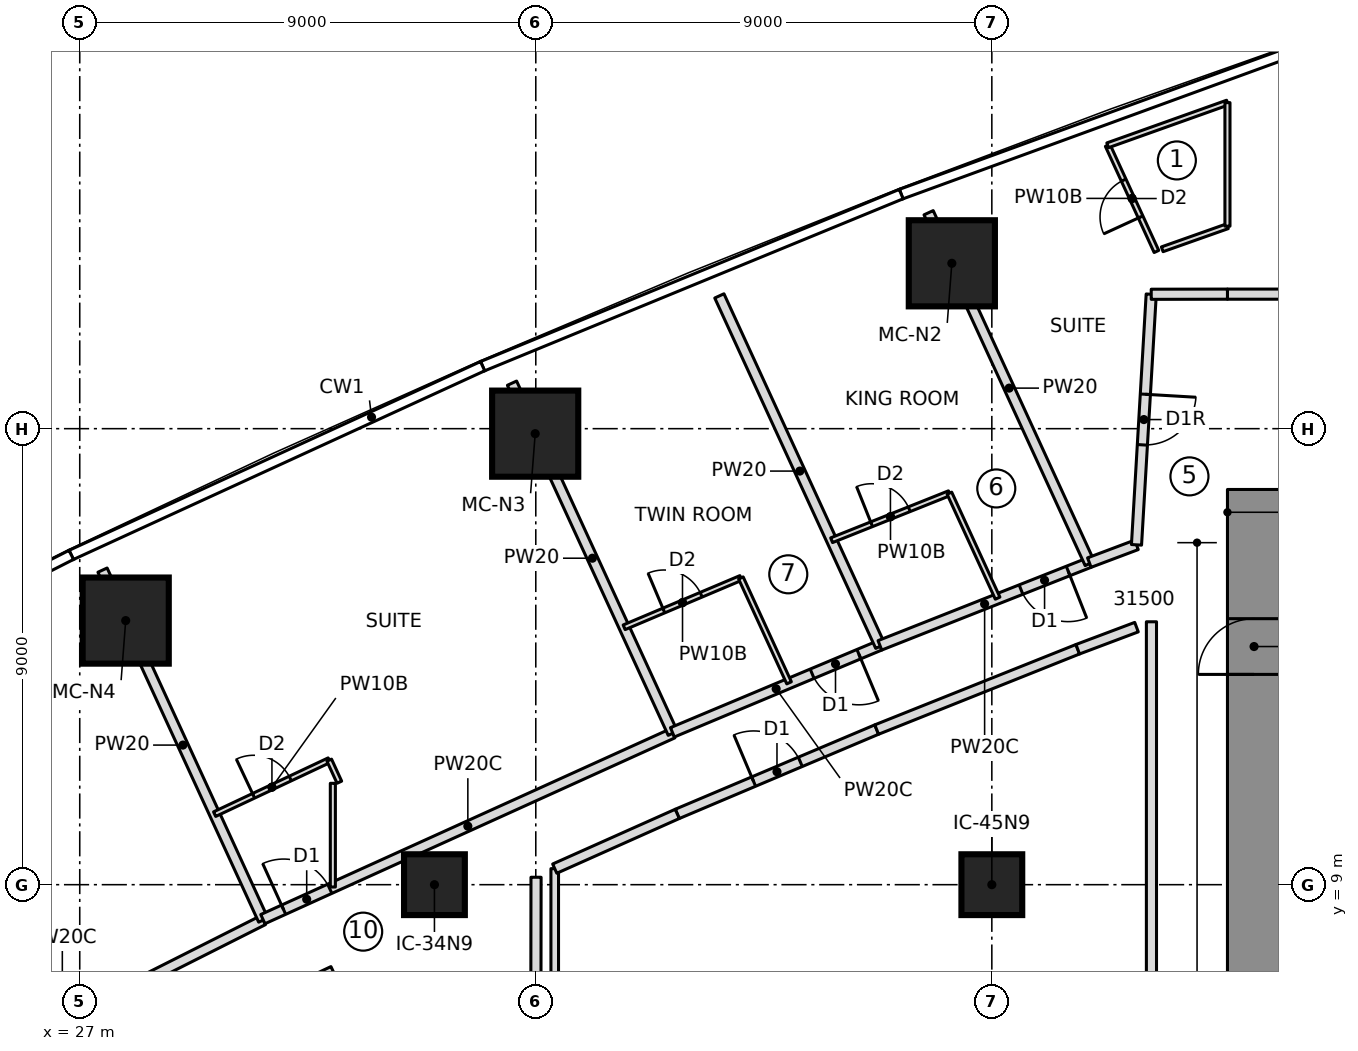
"""IFC4 building model, lengths in metres.
Left out: names, types, materials, properties, quantities, classifications, styles, units other than length and angle.
Written with IfcOpenShell. Run it as: python <this file> out.ifc"""

import sys

from ifc_helpers import new_model, si_unit, direction, frame, frame_2d, origin, origin_2d, place, context, subcontext, project, spatial, rectangle, extrude, element, fill, save


model = new_model("IFC4")
c1 = context("Model", 3, precision=1e-05, world=origin(), true_north=direction((0.0, 1.0)))
c2 = subcontext(c1, "Body", "Model", "MODEL_VIEW")
j1 = project(units=[si_unit("LENGTHUNIT", "METRE"), si_unit("PLANEANGLEUNIT", "RADIAN")], contexts=[c1])
p1 = place(None, origin())
s1 = spatial("IfcSite", under=j1, at=p1, CompositionType="ELEMENT")
p2 = place(p1, origin())
s2 = spatial("IfcBuilding", under=s1, at=p2, CompositionType="ELEMENT")
p3 = place(p2, frame((0.0, 0.0, 95.55)))
s3 = spatial("IfcBuildingStorey", under=s2, at=p3, CompositionType="ELEMENT", Elevation=95.55)
p4 = place(p3, frame((50.175, 6.65, 0.0), z_axis=(0.0, 0.0, 1.0), x_axis=(0.0, 1.0, 0.0)))
e1 = element("IfcWall", 1, at=p4, inside=s3, PredefinedType="SHEAR", context=c2, shape_type="SweptSolid", body=[
    extrude(rectangle(XDim=10.15, YDim=1.05, at=frame_2d((5.075, 0.0))), origin(), (0.0, 0.0, 1.0), 3.55),
])
p5 = place(p4, frame((6.5, 0.0, 0.0)))
e2 = element("IfcOpeningElement", 2, at=p5, cuts=e1, PredefinedType="OPENING", context=c2, shape_type="SweptSolid", body=[
    extrude(rectangle(XDim=1.1, YDim=2.1, at=frame_2d((0.55, 1.05))), frame((0.0, 0.535, 0.0), z_axis=(0.0, -1.0, 0.0), x_axis=(1.0, 0.0, 0.0)), (0.0, 0.0, 1.0), 1.07),
])
for number, where, z_axis, x_axis in (
    (3, (44.211, 21.264, 0.0), (0.0, 0.0, 1.0), (1.0, 0.0, 0.0)),
    (4, (35.988, 17.902, 0.0), (0.0, 0.0, 1.0), (1.0, 0.0, 0.0)),
    (5, (27.907, 14.212, 0.0), (0.0, 0.0, 1.0), (1.0, 0.0, 0.0)),
):
    element("IfcColumn", number, at=place(p3, frame(where, z_axis=z_axis, x_axis=x_axis)), inside=s3, PredefinedType="COLUMN", context=c2, shape_type="SweptSolid", body=[
        extrude(rectangle(XDim=1.7, YDim=1.7, at=origin_2d()), origin(), (0.0, 0.0, 1.0), 3.55),
    ])
for number, where, z_axis, x_axis in (
    (6, (34.0, 9.0, 0.0), (0.0, 0.0, 1.0), (1.0, 0.0, 0.0)),
    (7, (45.0, 9.0, 0.0), (0.0, 0.0, 1.0), (1.0, 0.0, 0.0)),
):
    element("IfcColumn", number, at=place(p3, frame(where, z_axis=z_axis, x_axis=x_axis)), inside=s3, PredefinedType="COLUMN", context=c2, shape_type="SweptSolid", body=[
        extrude(rectangle(XDim=1.2, YDim=1.2, at=origin_2d()), origin(), (0.0, 0.0, 1.0), 3.55),
    ])
p6 = place(p3, frame((22.69, 4.302, 0.0), z_axis=(0.0, 0.0, 1.0), x_axis=(0.892904919467, 0.450245271815, 0.0)))
e8 = element("IfcWall", 8, at=p6, inside=s3, PredefinedType="PARTITIONING", context=c2, shape_type="SweptSolid", body=[
    extrude(rectangle(XDim=8.883, YDim=0.2, at=frame_2d((4.441, 0.0))), origin(), (0.0, 0.0, 1.0), 3.25),
])
p7 = place(p6, frame((3.05, 0.0, 0.0)))
e9 = element("IfcOpeningElement", 9, at=p7, cuts=e8, PredefinedType="OPENING", context=c2, shape_type="SweptSolid", body=[
    extrude(rectangle(XDim=1.0, YDim=2.1, at=frame_2d((0.5, 1.05))), frame((0.0, 0.11, 0.0), z_axis=(0.0, -1.0, 0.0), x_axis=(1.0, 0.0, 0.0)), (0.0, 0.0, 1.0), 0.22),
])
p8 = place(p3, frame((30.622, 8.302, 0.0), z_axis=(0.0, 0.0, 1.0), x_axis=(-0.417429919618, 0.90870911859, 0.0)))
e10 = element("IfcWall", 10, at=p8, inside=s3, PredefinedType="PARTITIONING", context=c2, shape_type="SweptSolid", body=[
    extrude(rectangle(XDim=7.6, YDim=0.2, at=frame_2d((3.8, 0.0))), origin(), (0.0, 0.0, 1.0), 3.25),
])
p9 = place(p3, frame((30.614, 8.32, 0.0), z_axis=(0.0, 0.0, 1.0), x_axis=(0.910751030363, 0.41295588226, 0.0)))
e11 = element("IfcWall", 11, at=p9, inside=s3, PredefinedType="PARTITIONING", context=c2, shape_type="SweptSolid", body=[
    extrude(rectangle(XDim=8.883, YDim=0.2, at=frame_2d((4.442, 0.0))), origin(), (0.0, 0.0, 1.0), 3.25),
])
p10 = place(p9, frame((0.45, 0.0, 0.0)))
e12 = element("IfcOpeningElement", 12, at=p10, cuts=e11, PredefinedType="OPENING", context=c2, shape_type="SweptSolid", body=[
    extrude(rectangle(XDim=1.0, YDim=2.1, at=frame_2d((0.5, 1.05))), frame((0.0, 0.11, 0.0), z_axis=(0.0, -1.0, 0.0), x_axis=(1.0, 0.0, 0.0)), (0.0, 0.0, 1.0), 0.22),
])
p11 = place(p3, frame((29.662, 10.392, 0.0), z_axis=(0.0, 0.0, 1.0), x_axis=(0.904688082375, 0.426074493027, 0.0)))
e13 = element("IfcWall", 13, at=p11, inside=s3, PredefinedType="PARTITIONING", context=c2, shape_type="SweptSolid", body=[
    extrude(rectangle(XDim=2.5, YDim=0.1, at=frame_2d((1.25, 0.0))), origin(), (0.0, 0.0, 1.0), 3.25),
])
p12 = place(p11, frame((0.85, 0.0, 0.0)))
e14 = element("IfcOpeningElement", 14, at=p12, cuts=e13, PredefinedType="OPENING", context=c2, shape_type="SweptSolid", body=[
    extrude(rectangle(XDim=0.8, YDim=2.1, at=frame_2d((0.4, 1.05))), frame((0.0, 0.06, 0.0), z_axis=(0.0, -1.0, 0.0), x_axis=(1.0, 0.0, 0.0)), (0.0, 0.0, 1.0), 0.12),
])
p13 = place(p3, frame((31.924, 11.457, 0.0), z_axis=(0.0, 0.0, 1.0), x_axis=(0.4176025781, -0.908629785316, 0.0)))
e15 = element("IfcWall", 15, at=p13, inside=s3, PredefinedType="PARTITIONING", context=c2, shape_type="SweptSolid", body=[
    extrude(rectangle(XDim=0.479, YDim=0.1, at=frame_2d((0.239, 0.0))), origin(), (0.0, 0.0, 1.0), 3.25),
])
p14 = place(p3, frame((38.704, 11.989, 0.0), z_axis=(0.0, 0.0, 1.0), x_axis=(-0.417416334044, 0.908715359215, 0.0)))
e16 = element("IfcWall", 16, at=p14, inside=s3, PredefinedType="PARTITIONING", context=c2, shape_type="SweptSolid", body=[
    extrude(rectangle(XDim=7.604, YDim=0.2, at=frame_2d((3.802, 0.0))), origin(), (0.0, 0.0, 1.0), 3.25),
])
p15 = place(p3, frame((42.791, 13.724, 0.0), z_axis=(0.0, 0.0, 1.0), x_axis=(-0.922230433067, -0.386640696675, 0.0)))
e17 = element("IfcWall", 17, at=p15, inside=s3, PredefinedType="PARTITIONING", context=c2, shape_type="SweptSolid", body=[
    extrude(rectangle(XDim=4.44, YDim=0.2, at=frame_2d((2.22, 0.0))), origin(), (0.0, 0.0, 1.0), 3.25),
])
p16 = place(p15, frame((0.45, 0.0, 0.0)))
e18 = element("IfcOpeningElement", 18, at=p16, cuts=e17, PredefinedType="OPENING", context=c2, shape_type="SweptSolid", body=[
    extrude(rectangle(XDim=1.0, YDim=2.1, at=frame_2d((0.5, 1.05))), frame((0.0, 0.11, 0.0), z_axis=(0.0, -1.0, 0.0), x_axis=(1.0, 0.0, 0.0)), (0.0, 0.0, 1.0), 0.22),
])
p17 = place(p3, frame((37.744, 14.08, 0.0), z_axis=(0.0, 0.0, 1.0), x_axis=(0.921042675983, 0.38946166566, 0.0)))
e19 = element("IfcWall", 19, at=p17, inside=s3, PredefinedType="PARTITIONING", context=c2, shape_type="SweptSolid", body=[
    extrude(rectangle(XDim=2.501, YDim=0.1, at=frame_2d((1.25, 0.0))), origin(), (0.0, 0.0, 1.0), 3.25),
])
p18 = place(p17, frame((0.85, 0.0, 0.0)))
e20 = element("IfcOpeningElement", 20, at=p18, cuts=e19, PredefinedType="OPENING", context=c2, shape_type="SweptSolid", body=[
    extrude(rectangle(XDim=0.8, YDim=2.1, at=frame_2d((0.4, 1.05))), frame((0.0, 0.06, 0.0), z_axis=(0.0, -1.0, 0.0), x_axis=(1.0, 0.0, 0.0)), (0.0, 0.0, 1.0), 0.12),
])
p19 = place(p3, frame((40.048, 15.054, 0.0), z_axis=(0.0, 0.0, 1.0), x_axis=(0.417433204355, -0.908707609686, 0.0)))
e21 = element("IfcWall", 21, at=p19, inside=s3, PredefinedType="PARTITIONING", context=c2, shape_type="SweptSolid", body=[
    extrude(rectangle(XDim=2.278, YDim=0.1, at=frame_2d((1.139, 0.0))), origin(), (0.0, 0.0, 1.0), 3.25),
])
p20 = place(p3, frame((42.799, 13.705, 0.0), z_axis=(0.0, 0.0, 1.0), x_axis=(-0.417427858403, 0.908710065438, 0.0)))
e22 = element("IfcWall", 22, at=p20, inside=s3, PredefinedType="PARTITIONING", context=c2, shape_type="SweptSolid", body=[
    extrude(rectangle(XDim=7.61, YDim=0.2, at=frame_2d((3.805, 0.0))), origin(), (0.0, 0.0, 1.0), 3.25),
])
p21 = place(p3, frame((46.924, 15.357, 0.0), z_axis=(0.0, 0.0, 1.0), x_axis=(-0.930040633249, -0.367456692014, 0.0)))
e23 = element("IfcWall", 23, at=p21, inside=s3, PredefinedType="PARTITIONING", context=c2, shape_type="SweptSolid", body=[
    extrude(rectangle(XDim=4.444, YDim=0.2, at=frame_2d((2.222, 0.0))), origin(), (0.0, 0.0, 1.0), 3.25),
])
p22 = place(p21, frame((0.45, 0.0, 0.0)))
e24 = element("IfcOpeningElement", 24, at=p22, cuts=e23, PredefinedType="OPENING", context=c2, shape_type="SweptSolid", body=[
    extrude(rectangle(XDim=1.0, YDim=2.1, at=frame_2d((0.5, 1.05))), frame((0.0, 0.11, 0.0), z_axis=(0.0, -1.0, 0.0), x_axis=(1.0, 0.0, 0.0)), (0.0, 0.0, 1.0), 0.22),
])
p23 = place(p3, frame((41.838, 15.798, 0.0), z_axis=(0.0, 0.0, 1.0), x_axis=(0.928638024739, 0.370987087388, 0.0)))
e25 = element("IfcWall", 25, at=p23, inside=s3, PredefinedType="PARTITIONING", context=c2, shape_type="SweptSolid", body=[
    extrude(rectangle(XDim=2.503, YDim=0.1, at=frame_2d((1.252, 0.0))), origin(), (0.0, 0.0, 1.0), 3.25),
])
p24 = place(p23, frame((0.85, 0.0, 0.0)))
e26 = element("IfcOpeningElement", 26, at=p24, cuts=e25, PredefinedType="OPENING", context=c2, shape_type="SweptSolid", body=[
    extrude(rectangle(XDim=0.8, YDim=2.1, at=frame_2d((0.4, 1.05))), frame((0.0, 0.06, 0.0), z_axis=(0.0, -1.0, 0.0), x_axis=(1.0, 0.0, 0.0)), (0.0, 0.0, 1.0), 0.12),
])
p25 = place(p3, frame((44.163, 16.727, 0.0), z_axis=(0.0, 0.0, 1.0), x_axis=(0.417373525971, -0.908735021785, 0.0)))
e27 = element("IfcWall", 27, at=p25, inside=s3, PredefinedType="PARTITIONING", context=c2, shape_type="SweptSolid", body=[
    extrude(rectangle(XDim=2.28, YDim=0.1, at=frame_2d((1.14, 0.0))), origin(), (0.0, 0.0, 1.0), 3.25),
])
p26 = place(p3, frame((46.933, 15.339, 0.0), z_axis=(0.0, 0.0, 1.0), x_axis=(-0.417437957167, 0.908705426371, 0.0)))
e28 = element("IfcWall", 28, at=p26, inside=s3, PredefinedType="PARTITIONING", context=c2, shape_type="SweptSolid", body=[
    extrude(rectangle(XDim=7.619, YDim=0.2, at=frame_2d((3.81, 0.0))), origin(), (0.0, 0.0, 1.0), 3.25),
])
p27 = place(p3, frame((49.65, 21.996, 0.0), z_axis=(0.0, 0.0, 1.0), x_axis=(-0.942692856107, -0.333661773425, 0.0)))
e29 = element("IfcWall", 29, at=p27, inside=s3, PredefinedType="PARTITIONING", context=c2, shape_type="SweptSolid", body=[
    extrude(rectangle(XDim=1.365, YDim=0.1, at=frame_2d((0.683, 0.0))), origin(), (0.0, 0.0, 1.0), 3.25),
])
p28 = place(p3, frame((48.249, 21.497, 0.0), z_axis=(0.0, 0.0, 1.0), x_axis=(-0.41749308293, 0.908680100864, 0.0)))
e30 = element("IfcWall", 30, at=p28, inside=s3, PredefinedType="PARTITIONING", context=c2, shape_type="SweptSolid", body=[
    extrude(rectangle(XDim=2.306, YDim=0.1, at=frame_2d((1.153, 0.0))), origin(), (0.0, 0.0, 1.0), 3.25),
])
p29 = place(p28, frame((0.75, 0.0, 0.0)))
e31 = element("IfcOpeningElement", 31, at=p29, cuts=e30, PredefinedType="OPENING", context=c2, shape_type="SweptSolid", body=[
    extrude(rectangle(XDim=0.8, YDim=2.1, at=frame_2d((0.4, 1.05))), frame((0.0, 0.06, 0.0), z_axis=(0.0, -1.0, 0.0), x_axis=(1.0, 0.0, 0.0)), (0.0, 0.0, 1.0), 0.12),
])
p30 = place(p3, frame((31.025, 6.833, 0.0), z_axis=(0.0, 0.0, 1.0), x_axis=(0.904690325494, 0.426069730159, 0.0)))
e32 = element("IfcWall", 32, at=p30, inside=s3, PredefinedType="PARTITIONING", context=c2, shape_type="SweptSolid", body=[
    extrude(rectangle(XDim=1.078, YDim=0.2, at=frame_2d((0.539, 0.0))), origin(), (0.0, 0.0, 1.0), 3.25),
])
p31 = place(p3, frame((36.374, -9.317, 0.0), z_axis=(0.0, 0.0, 1.0), x_axis=(0.0, 1.0, 0.0)))
e33 = element("IfcWall", 33, at=p31, inside=s3, PredefinedType="PARTITIONING", context=c2, shape_type="SweptSolid", body=[
    extrude(rectangle(XDim=18.634, YDim=0.15, at=frame_2d((9.317, 0.0))), origin(), (0.0, 0.0, 1.0), 3.25),
])
p32 = place(p3, frame((38.792, 10.397, 0.0), z_axis=(0.0, 0.0, 1.0), x_axis=(0.921037415532, 0.389474105929, 0.0)))
e34 = element("IfcWall", 34, at=p32, inside=s3, PredefinedType="PARTITIONING", context=c2, shape_type="SweptSolid", body=[
    extrude(rectangle(XDim=4.273, YDim=0.2, at=frame_2d((2.137, 0.0))), origin(), (0.0, 0.0, 1.0), 3.25),
])
p33 = place(p32, frame((1.636, 0.0, 0.0)))
e35 = element("IfcOpeningElement", 35, at=p33, cuts=e34, PredefinedType="OPENING", context=c2, shape_type="SweptSolid", body=[
    extrude(rectangle(XDim=1.0, YDim=2.1, at=frame_2d((0.5, 1.05))), frame((0.0, 0.11, 0.0), z_axis=(0.0, -1.0, 0.0), x_axis=(1.0, 0.0, 0.0)), (0.0, 0.0, 1.0), 0.22),
])
p34 = place(p3, frame((42.728, 12.062, 0.0), z_axis=(0.0, 0.0, 1.0), x_axis=(0.928638161177, 0.370986745864, 0.0)))
e36 = element("IfcWall", 36, at=p34, inside=s3, PredefinedType="PARTITIONING", context=c2, shape_type="SweptSolid", body=[
    extrude(rectangle(XDim=4.273, YDim=0.2, at=frame_2d((2.136, 0.0))), origin(), (0.0, 0.0, 1.0), 3.25),
])
p35 = place(p3, frame((36.374, 9.317, 0.0), z_axis=(0.0, 0.0, 1.0), x_axis=(0.913030623494, 0.407891015544, 0.0)))
e37 = element("IfcWall", 37, at=p35, inside=s3, PredefinedType="PARTITIONING", context=c2, shape_type="SweptSolid", body=[
    extrude(rectangle(XDim=2.648, YDim=0.2, at=frame_2d((1.324, 0.0))), origin(), (0.0, 0.0, 1.0), 3.25),
])
p36 = place(p3, frame((54.625, 20.655, 0.0), z_axis=(0.0, 0.0, 1.0), x_axis=(-1.0, 0.0, 0.0)))
e38 = element("IfcWall", 38, at=p36, inside=s3, PredefinedType="PARTITIONING", context=c2, shape_type="SweptSolid", body=[
    extrude(rectangle(XDim=4.976, YDim=0.2, at=frame_2d((2.488, 0.0))), origin(), (0.0, 0.0, 1.0), 3.25),
])
p37 = place(p36, frame((1.988, 0.0, 0.0)))
e39 = element("IfcOpeningElement", 39, at=p37, cuts=e38, PredefinedType="OPENING", context=c2, shape_type="SweptSolid", body=[
    extrude(rectangle(XDim=1.5, YDim=2.1, at=frame_2d((0.75, 1.05))), frame((0.0, 0.11, 0.0), z_axis=(0.0, -1.0, 0.0), x_axis=(1.0, 0.0, 0.0)), (0.0, 0.0, 1.0), 0.22),
])
p38 = place(p3, frame((31.995, 11.0, 0.0), z_axis=(0.0, 0.0, 1.0), x_axis=(0.0, -1.0, 0.0)))
e40 = element("IfcWall", 40, at=p38, inside=s3, PredefinedType="PARTITIONING", context=c2, shape_type="SweptSolid", body=[
    extrude(rectangle(XDim=2.046, YDim=0.1, at=frame_2d((1.023, 0.0))), origin(), (0.0, 0.0, 1.0), 3.25),
])
p39 = place(p3, frame((47.286, 23.592, 0.0), z_axis=(0.0, 0.0, 1.0), x_axis=(0.941933231826, 0.335800218555, 0.0)))
e41 = element("IfcWall", 41, at=p39, inside=s3, PredefinedType="PARTITIONING", context=c2, shape_type="SweptSolid", body=[
    extrude(rectangle(XDim=2.51, YDim=0.1, at=frame_2d((1.255, 0.0))), origin(), (0.0, 0.0, 1.0), 3.25),
])
p40 = place(p3, frame((49.65, 24.435, 0.0), z_axis=(0.0, 0.0, 1.0), x_axis=(0.0, -1.0, 0.0)))
e42 = element("IfcWall", 42, at=p40, inside=s3, PredefinedType="PARTITIONING", context=c2, shape_type="SweptSolid", body=[
    extrude(rectangle(XDim=2.439, YDim=0.1, at=frame_2d((1.22, 0.0))), origin(), (0.0, 0.0, 1.0), 3.25),
])
p41 = place(p3, frame((47.855, 15.707, 0.0), z_axis=(0.0, 0.0, 1.0), x_axis=(-0.935803526171, -0.35252199989, 0.0)))
e43 = element("IfcWall", 43, at=p41, inside=s3, PredefinedType="PARTITIONING", context=c2, shape_type="SweptSolid", body=[
    extrude(rectangle(XDim=0.995, YDim=0.2, at=frame_2d((0.497, 0.0))), origin(), (0.0, 0.0, 1.0), 3.25),
])
p42 = place(p3, frame((46.696, 13.647, 0.0), z_axis=(0.0, 0.0, 1.0), x_axis=(0.935907269358, 0.352246480696, 0.0)))
e44 = element("IfcWall", 44, at=p42, inside=s3, PredefinedType="PARTITIONING", context=c2, shape_type="SweptSolid", body=[
    extrude(rectangle(XDim=1.239, YDim=0.2, at=frame_2d((0.619, 0.0))), origin(), (0.0, 0.0, 1.0), 3.25),
])
p43 = place(p3, frame((48.146, 20.652, 0.0), z_axis=(0.0, 0.0, 1.0), x_axis=(-0.058649792989, -0.998278619315, 0.0)))
e45 = element("IfcWall", 45, at=p43, inside=s3, PredefinedType="PARTITIONING", context=c2, shape_type="SweptSolid", body=[
    extrude(rectangle(XDim=4.954, YDim=0.2, at=frame_2d((2.477, 0.0))), origin(), (0.0, 0.0, 1.0), 3.25),
])
p44 = place(p43, frame((1.977, 0.0, 0.0)))
e46 = element("IfcOpeningElement", 46, at=p44, cuts=e45, PredefinedType="OPENING", context=c2, shape_type="SweptSolid", body=[
    extrude(rectangle(XDim=1.0, YDim=2.1, at=frame_2d((0.5, 1.05))), frame((0.0, 0.11, 0.0), z_axis=(0.0, -1.0, 0.0), x_axis=(1.0, 0.0, 0.0)), (0.0, 0.0, 1.0), 0.22),
])
p45 = place(p3, frame((36.002, 7.036, 0.0), z_axis=(0.0, 0.0, 1.0), x_axis=(0.001156603436, 0.999999331134, 0.0)))
e47 = element("IfcWall", 47, at=p45, inside=s3, PredefinedType="PARTITIONING", context=c2, shape_type="SweptSolid", body=[
    extrude(rectangle(XDim=2.111, YDim=0.2, at=frame_2d((1.055, 0.0))), origin(), (0.0, 0.0, 1.0), 3.25),
])
p46 = place(p3, frame((48.15, 14.189, 0.0), z_axis=(0.0, 0.0, 1.0), x_axis=(0.0, -1.0, 0.0)))
e48 = element("IfcWall", 48, at=p46, inside=s3, PredefinedType="PARTITIONING", context=c2, shape_type="SweptSolid", body=[
    extrude(rectangle(XDim=28.377, YDim=0.2, at=frame_2d((14.189, 0.0))), origin(), (0.0, 0.0, 1.0), 3.25),
])
p47 = place(p3, frame((49.65, 20.655, 0.0), z_axis=(0.0, 0.0, 1.0), x_axis=(-0.999998406651, -0.001785131852, 0.0)))
e49 = element("IfcWall", 49, at=p47, inside=s3, PredefinedType="PARTITIONING", context=c2, shape_type="SweptSolid", body=[
    extrude(rectangle(XDim=1.504, YDim=0.2, at=frame_2d((0.752, 0.0))), origin(), (0.0, 0.0, 1.0), 3.25),
])
p48 = place(p12, origin())
e50 = element("IfcDoor", 50, at=p48, inside=s3, OperationType="SINGLE_SWING_LEFT", PredefinedType="DOOR", context=c2, shape_type="SweptSolid", body=[
    extrude(rectangle(XDim=0.8, YDim=2.1, at=frame_2d((0.4, 1.05))), frame((0.0, 0.025, 0.0), z_axis=(0.0, -1.0, 0.0), x_axis=(1.0, 0.0, 0.0)), (0.0, 0.0, 1.0), 0.05),
])
fill(e14, e50)
p49 = place(p10, origin())
e51 = element("IfcDoor", 51, at=p49, inside=s3, OperationType="SINGLE_SWING_LEFT", PredefinedType="DOOR", context=c2, shape_type="SweptSolid", body=[
    extrude(rectangle(XDim=1.0, YDim=2.1, at=frame_2d((0.5, 1.05))), frame((0.0, 0.025, 0.0), z_axis=(0.0, -1.0, 0.0), x_axis=(1.0, 0.0, 0.0)), (0.0, 0.0, 1.0), 0.05),
])
fill(e12, e51)
p50 = place(p18, origin())
e52 = element("IfcDoor", 52, at=p50, inside=s3, OperationType="SINGLE_SWING_LEFT", PredefinedType="DOOR", context=c2, shape_type="SweptSolid", body=[
    extrude(rectangle(XDim=0.8, YDim=2.1, at=frame_2d((0.4, 1.05))), frame((0.0, 0.025, 0.0), z_axis=(0.0, -1.0, 0.0), x_axis=(1.0, 0.0, 0.0)), (0.0, 0.0, 1.0), 0.05),
])
fill(e20, e52)
p51 = place(p16, origin())
e53 = element("IfcDoor", 53, at=p51, inside=s3, OperationType="SINGLE_SWING_LEFT", PredefinedType="DOOR", context=c2, shape_type="SweptSolid", body=[
    extrude(rectangle(XDim=1.0, YDim=2.1, at=frame_2d((0.5, 1.05))), frame((0.0, 0.025, 0.0), z_axis=(0.0, -1.0, 0.0), x_axis=(1.0, 0.0, 0.0)), (0.0, 0.0, 1.0), 0.05),
])
fill(e18, e53)
p52 = place(p24, origin())
e54 = element("IfcDoor", 54, at=p52, inside=s3, OperationType="SINGLE_SWING_LEFT", PredefinedType="DOOR", context=c2, shape_type="SweptSolid", body=[
    extrude(rectangle(XDim=0.8, YDim=2.1, at=frame_2d((0.4, 1.05))), frame((0.0, 0.025, 0.0), z_axis=(0.0, -1.0, 0.0), x_axis=(1.0, 0.0, 0.0)), (0.0, 0.0, 1.0), 0.05),
])
fill(e26, e54)
p53 = place(p22, origin())
e55 = element("IfcDoor", 55, at=p53, inside=s3, OperationType="SINGLE_SWING_LEFT", PredefinedType="DOOR", context=c2, shape_type="SweptSolid", body=[
    extrude(rectangle(XDim=1.0, YDim=2.1, at=frame_2d((0.5, 1.05))), frame((0.0, 0.025, 0.0), z_axis=(0.0, -1.0, 0.0), x_axis=(1.0, 0.0, 0.0)), (0.0, 0.0, 1.0), 0.05),
])
fill(e24, e55)
p54 = place(p29, origin())
e56 = element("IfcDoor", 56, at=p54, inside=s3, OperationType="SINGLE_SWING_LEFT", PredefinedType="DOOR", context=c2, shape_type="SweptSolid", body=[
    extrude(rectangle(XDim=0.8, YDim=2.1, at=frame_2d((0.4, 1.05))), frame((0.0, 0.025, 0.0), z_axis=(0.0, -1.0, 0.0), x_axis=(1.0, 0.0, 0.0)), (0.0, 0.0, 1.0), 0.05),
])
fill(e31, e56)
p55 = place(p33, origin())
e57 = element("IfcDoor", 57, at=p55, inside=s3, OperationType="SINGLE_SWING_LEFT", PredefinedType="DOOR", context=c2, shape_type="SweptSolid", body=[
    extrude(rectangle(XDim=1.0, YDim=2.1, at=frame_2d((0.5, 1.05))), frame((0.0, 0.025, 0.0), z_axis=(0.0, -1.0, 0.0), x_axis=(1.0, 0.0, 0.0)), (0.0, 0.0, 1.0), 0.05),
])
fill(e35, e57)
p56 = place(p44, origin())
e58 = element("IfcDoor", 58, at=p56, inside=s3, OperationType="SINGLE_SWING_RIGHT", PredefinedType="DOOR", context=c2, shape_type="SweptSolid", body=[
    extrude(rectangle(XDim=1.0, YDim=2.1, at=frame_2d((0.5, 1.05))), frame((0.0, 0.025, 0.0), z_axis=(0.0, -1.0, 0.0), x_axis=(1.0, 0.0, 0.0)), (0.0, 0.0, 1.0), 0.05),
])
fill(e46, e58)
p57 = place(p5, origin())
e59 = element("IfcDoor", 59, at=p57, inside=s3, OperationType="SINGLE_SWING_RIGHT", PredefinedType="DOOR", context=c2, shape_type="SweptSolid", body=[
    extrude(rectangle(XDim=1.1, YDim=2.1, at=frame_2d((0.55, 1.05))), frame((0.0, 0.025, 0.0), z_axis=(0.0, -1.0, 0.0), x_axis=(1.0, 0.0, 0.0)), (0.0, 0.0, 1.0), 0.05),
])
fill(e2, e59)
save(model, sys.argv[1])
